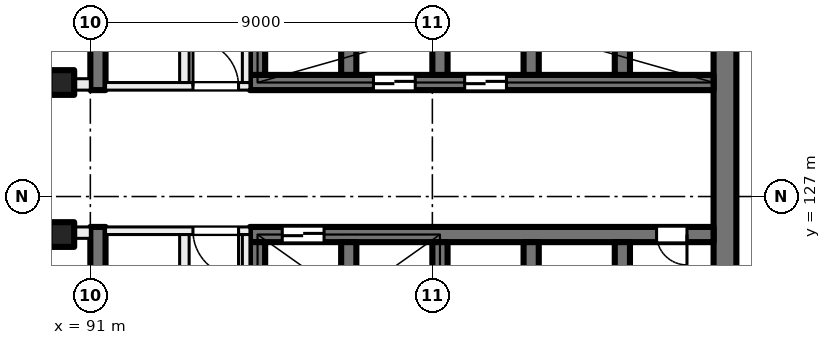
"""IFC4 building model, lengths in metres.
Left out: names, types, materials, properties, quantities, classifications, styles, units other than length and angle.
Written with IfcOpenShell. Run it as: python <this file> out.ifc"""

import sys

from ifc_helpers import new_model, si_unit, direction, frame, frame_2d, origin, origin_2d, place, context, subcontext, project, spatial, rectangle, extrude, element, fill, save


model = new_model("IFC4")
c1 = context("Model", 3, precision=1e-05, world=origin(), true_north=direction((0.0, 1.0)))
c2 = subcontext(c1, "Body", "Model", "MODEL_VIEW")
j1 = project(units=[si_unit("LENGTHUNIT", "METRE"), si_unit("PLANEANGLEUNIT", "RADIAN")], contexts=[c1])
p1 = place(None, origin())
s1 = spatial("IfcSite", under=j1, at=p1, CompositionType="ELEMENT")
p2 = place(p1, origin())
s2 = spatial("IfcBuilding", under=s1, at=p2, CompositionType="ELEMENT")
p3 = place(p2, frame((0.0, 0.0, 121.0)))
s3 = spatial("IfcBuildingStorey", under=s2, at=p3, CompositionType="ELEMENT", Elevation=121.0)
for number, where, z_axis, x_axis in (
    (1, (90.25, 130.0, 0.0), (0.0, 0.0, 1.0), (1.0, 0.0, 0.0)),
    (2, (90.25, 126.0, 0.0), (0.0, 0.0, 1.0), (1.0, 0.0, 0.0)),
):
    element("IfcColumn", number, at=place(p3, frame(where, z_axis=z_axis, x_axis=x_axis)), inside=s3, PredefinedType="COLUMN", context=c2, shape_type="SweptSolid", body=[
        extrude(rectangle(XDim=0.65, YDim=0.65, at=origin_2d()), origin(), (0.0, 0.0, 1.0), 4.0),
    ])
p4 = place(p3, frame((107.7, 135.2, 0.0), z_axis=(0.0, 0.0, 1.0), x_axis=(0.0, -1.0, 0.0)))
e3 = element("IfcWall", 3, at=p4, inside=s3, PredefinedType="SHEAR", context=c2, shape_type="SweptSolid", body=[
    extrude(rectangle(XDim=14.4, YDim=0.6, at=frame_2d((7.2, 0.0))), origin(), (0.0, 0.0, 1.0), 4.0),
])
p5 = place(p3, frame((107.4, 130.0, 0.0), z_axis=(0.0, 0.0, 1.0), x_axis=(-1.0, 0.0, 0.0)))
e4 = element("IfcWall", 4, at=p5, inside=s3, PredefinedType="SHEAR", context=c2, shape_type="SweptSolid", body=[
    extrude(rectangle(XDim=12.2, YDim=0.4, at=frame_2d((6.1, 0.0))), origin(), (0.0, 0.0, 1.0), 4.0),
])
p6 = place(p5, frame((5.45, 0.0, 0.0)))
e5 = element("IfcOpeningElement", 5, at=p6, cuts=e4, PredefinedType="OPENING", context=c2, shape_type="SweptSolid", body=[
    extrude(rectangle(XDim=1.1, YDim=2.1, at=frame_2d((0.55, 1.05))), frame((0.0, 0.21, 0.0), z_axis=(0.0, -1.0, 0.0), x_axis=(1.0, 0.0, 0.0)), (0.0, 0.0, 1.0), 0.42),
])
p7 = place(p5, frame((7.85, 0.0, 0.0)))
e6 = element("IfcOpeningElement", 6, at=p7, cuts=e4, PredefinedType="OPENING", context=c2, shape_type="SweptSolid", body=[
    extrude(rectangle(XDim=1.1, YDim=2.1, at=frame_2d((0.55, 1.05))), frame((0.0, 0.21, 0.0), z_axis=(0.0, -1.0, 0.0), x_axis=(1.0, 0.0, 0.0)), (0.0, 0.0, 1.0), 0.42),
])
for number, where, z_axis, x_axis in (
    (7, (105.0, 133.2, 0.0), (0.0, 0.0, 1.0), (0.0, -1.0, 0.0)),
    (8, (102.6, 133.2, 0.0), (0.0, 0.0, 1.0), (0.0, -1.0, 0.0)),
    (9, (100.2, 133.2, 0.0), (0.0, 0.0, 1.0), (0.0, -1.0, 0.0)),
    (10, (97.8, 133.2, 0.0), (0.0, 0.0, 1.0), (0.0, -1.0, 0.0)),
    (11, (95.4, 133.2, 0.0), (0.0, 0.0, 1.0), (0.0, -1.0, 0.0)),
):
    element("IfcWall", number, at=place(p3, frame(where, z_axis=z_axis, x_axis=x_axis)), inside=s3, PredefinedType="SHEAR", context=c2, shape_type="SweptSolid", body=[
        extrude(rectangle(XDim=3.0, YDim=0.4, at=frame_2d((1.5, 0.0))), origin(), (0.0, 0.0, 1.0), 4.0),
    ])
p8 = place(p3, frame((107.4, 126.0, 0.0), z_axis=(0.0, 0.0, 1.0), x_axis=(-1.0, 0.0, 0.0)))
e12 = element("IfcWall", 12, at=p8, inside=s3, PredefinedType="SHEAR", context=c2, shape_type="SweptSolid", body=[
    extrude(rectangle(XDim=12.2, YDim=0.4, at=frame_2d((6.1, 0.0))), origin(), (0.0, 0.0, 1.0), 4.0),
])
p9 = place(p8, frame((10.25, 0.0, 0.0)))
e13 = element("IfcOpeningElement", 13, at=p9, cuts=e12, PredefinedType="OPENING", context=c2, shape_type="SweptSolid", body=[
    extrude(rectangle(XDim=1.1, YDim=2.1, at=frame_2d((0.55, 1.05))), frame((0.0, 0.21, 0.0), z_axis=(0.0, -1.0, 0.0), x_axis=(1.0, 0.0, 0.0)), (0.0, 0.0, 1.0), 0.42),
])
p10 = place(p8, frame((0.7, 0.0, 0.0)))
e14 = element("IfcOpeningElement", 14, at=p10, cuts=e12, PredefinedType="OPENING", context=c2, shape_type="SweptSolid", body=[
    extrude(rectangle(XDim=0.8, YDim=2.1, at=frame_2d((0.4, 1.05))), frame((0.0, 0.21, 0.0), z_axis=(0.0, -1.0, 0.0), x_axis=(1.0, 0.0, 0.0)), (0.0, 0.0, 1.0), 0.42),
])
for number, where, z_axis, x_axis in (
    (15, (105.0, 125.8, 0.0), (0.0, 0.0, 1.0), (0.0, -1.0, 0.0)),
    (16, (102.6, 125.8, 0.0), (0.0, 0.0, 1.0), (0.0, -1.0, 0.0)),
    (17, (100.2, 125.8, 0.0), (0.0, 0.0, 1.0), (0.0, -1.0, 0.0)),
    (18, (97.8, 125.8, 0.0), (0.0, 0.0, 1.0), (0.0, -1.0, 0.0)),
    (19, (95.4, 125.8, 0.0), (0.0, 0.0, 1.0), (0.0, -1.0, 0.0)),
):
    element("IfcWall", number, at=place(p3, frame(where, z_axis=z_axis, x_axis=x_axis)), inside=s3, PredefinedType="SHEAR", context=c2, shape_type="SweptSolid", body=[
        extrude(rectangle(XDim=3.0, YDim=0.4, at=frame_2d((1.5, 0.0))), origin(), (0.0, 0.0, 1.0), 4.0),
    ])
for number, where, z_axis, x_axis in (
    (20, (91.2, 138.4, 0.0), (0.0, 0.0, 1.0), (0.0, -1.0, 0.0)),
    (21, (91.2, 126.2, 0.0), (0.0, 0.0, 1.0), (0.0, -1.0, 0.0)),
):
    element("IfcWall", number, at=place(p3, frame(where, z_axis=z_axis, x_axis=x_axis)), inside=s3, PredefinedType="SHEAR", context=c2, shape_type="SweptSolid", body=[
        extrude(rectangle(XDim=8.6, YDim=0.4, at=frame_2d((4.3, 0.0))), origin(), (0.0, 0.0, 1.0), 4.0),
    ])
p11 = place(p3, frame((95.2, 126.1, 0.0), z_axis=(0.0, 0.0, 1.0), x_axis=(-1.0, 0.0, 0.0)))
e22 = element("IfcWall", 22, at=p11, inside=s3, PredefinedType="PARTITIONING", context=c2, shape_type="SweptSolid", body=[
    extrude(rectangle(XDim=3.8, YDim=0.2, at=frame_2d((1.9, 0.0))), origin(), (0.0, 0.0, 1.0), 3.625),
])
p12 = place(p11, frame((0.3, 0.0, 0.0)))
e23 = element("IfcOpeningElement", 23, at=p12, cuts=e22, PredefinedType="OPENING", context=c2, shape_type="SweptSolid", body=[
    extrude(rectangle(XDim=1.2, YDim=2.1, at=frame_2d((0.6, 1.05))), frame((0.0, 0.11, 0.0), z_axis=(0.0, -1.0, 0.0), x_axis=(1.0, 0.0, 0.0)), (0.0, 0.0, 1.0), 0.22),
])
p13 = place(p3, frame((95.1, 117.6, 0.0), z_axis=(0.0, 0.0, 1.0), x_axis=(0.0, 1.0, 0.0)))
e24 = element("IfcWall", 24, at=p13, inside=s3, PredefinedType="PARTITIONING", context=c2, shape_type="SweptSolid", body=[
    extrude(rectangle(XDim=8.4, YDim=0.2, at=frame_2d((4.2, 0.0))), origin(), (0.0, 0.0, 1.0), 3.625),
])
p14 = place(p13, frame((1.65, 0.0, 0.0)))
e25 = element("IfcOpeningElement", 25, at=p14, cuts=e24, PredefinedType="OPENING", context=c2, shape_type="SweptSolid", body=[
    extrude(rectangle(XDim=1.5, YDim=2.1, at=frame_2d((0.75, 1.05))), frame((0.0, 0.11, 0.0), z_axis=(0.0, -1.0, 0.0), x_axis=(1.0, 0.0, 0.0)), (0.0, 0.0, 1.0), 0.22),
])
p15 = place(p3, frame((93.475, 117.6, 0.0), z_axis=(0.0, 0.0, 1.0), x_axis=(0.0, 1.0, 0.0)))
e26 = element("IfcWall", 26, at=p15, inside=s3, PredefinedType="PARTITIONING", context=c2, shape_type="SweptSolid", body=[
    extrude(rectangle(XDim=8.4, YDim=0.25, at=frame_2d((4.2, 0.0))), origin(), (0.0, 0.0, 1.0), 3.625),
])
p16 = place(p15, frame((5.225, 0.0, 0.0)))
e27 = element("IfcOpeningElement", 27, at=p16, cuts=e26, PredefinedType="OPENING", context=c2, shape_type="SweptSolid", body=[
    extrude(rectangle(XDim=0.8, YDim=2.1, at=frame_2d((0.4, 1.05))), frame((0.0, 0.135, 0.0), z_axis=(0.0, -1.0, 0.0), x_axis=(1.0, 0.0, 0.0)), (0.0, 0.0, 1.0), 0.27),
])
p17 = place(p15, frame((0.975, 0.0, 0.0)))
e28 = element("IfcOpeningElement", 28, at=p17, cuts=e26, PredefinedType="OPENING", context=c2, shape_type="SweptSolid", body=[
    extrude(rectangle(XDim=0.8, YDim=2.1, at=frame_2d((0.4, 1.05))), frame((0.0, 0.135, 0.0), z_axis=(0.0, -1.0, 0.0), x_axis=(1.0, 0.0, 0.0)), (0.0, 0.0, 1.0), 0.27),
])
p18 = place(p3, frame((91.4, 129.9, 0.0), z_axis=(0.0, 0.0, 1.0), x_axis=(1.0, 0.0, 0.0)))
e29 = element("IfcWall", 29, at=p18, inside=s3, PredefinedType="PARTITIONING", context=c2, shape_type="SweptSolid", body=[
    extrude(rectangle(XDim=3.8, YDim=0.2, at=frame_2d((1.9, 0.0))), origin(), (0.0, 0.0, 1.0), 3.625),
])
p19 = place(p18, frame((2.3, 0.0, 0.0)))
e30 = element("IfcOpeningElement", 30, at=p19, cuts=e29, PredefinedType="OPENING", context=c2, shape_type="SweptSolid", body=[
    extrude(rectangle(XDim=1.2, YDim=2.1, at=frame_2d((0.6, 1.05))), frame((0.0, 0.11, 0.0), z_axis=(0.0, -1.0, 0.0), x_axis=(1.0, 0.0, 0.0)), (0.0, 0.0, 1.0), 0.22),
])
p20 = place(p3, frame((95.1, 130.0, 0.0), z_axis=(0.0, 0.0, 1.0), x_axis=(0.0, 1.0, 0.0)))
e31 = element("IfcWall", 31, at=p20, inside=s3, PredefinedType="PARTITIONING", context=c2, shape_type="SweptSolid", body=[
    extrude(rectangle(XDim=8.4, YDim=0.2, at=frame_2d((4.2, 0.0))), origin(), (0.0, 0.0, 1.0), 3.625),
])
p21 = place(p20, frame((5.25, 0.0, 0.0)))
e32 = element("IfcOpeningElement", 32, at=p21, cuts=e31, PredefinedType="OPENING", context=c2, shape_type="SweptSolid", body=[
    extrude(rectangle(XDim=1.5, YDim=2.1, at=frame_2d((0.75, 1.05))), frame((0.0, 0.11, 0.0), z_axis=(0.0, -1.0, 0.0), x_axis=(1.0, 0.0, 0.0)), (0.0, 0.0, 1.0), 0.22),
])
p22 = place(p3, frame((93.475, 130.0, 0.0), z_axis=(0.0, 0.0, 1.0), x_axis=(0.0, 1.0, 0.0)))
e33 = element("IfcWall", 33, at=p22, inside=s3, PredefinedType="PARTITIONING", context=c2, shape_type="SweptSolid", body=[
    extrude(rectangle(XDim=8.4, YDim=0.25, at=frame_2d((4.2, 0.0))), origin(), (0.0, 0.0, 1.0), 3.625),
])
p23 = place(p22, frame((1.675, 0.0, 0.0)))
e34 = element("IfcOpeningElement", 34, at=p23, cuts=e33, PredefinedType="OPENING", context=c2, shape_type="SweptSolid", body=[
    extrude(rectangle(XDim=0.8, YDim=2.1, at=frame_2d((0.4, 1.05))), frame((0.0, 0.135, 0.0), z_axis=(0.0, -1.0, 0.0), x_axis=(1.0, 0.0, 0.0)), (0.0, 0.0, 1.0), 0.27),
])
p24 = place(p22, frame((5.925, 0.0, 0.0)))
e35 = element("IfcOpeningElement", 35, at=p24, cuts=e33, PredefinedType="OPENING", context=c2, shape_type="SweptSolid", body=[
    extrude(rectangle(XDim=0.8, YDim=2.1, at=frame_2d((0.4, 1.05))), frame((0.0, 0.135, 0.0), z_axis=(0.0, -1.0, 0.0), x_axis=(1.0, 0.0, 0.0)), (0.0, 0.0, 1.0), 0.27),
])
p25 = place(p3, frame((72.5, 129.95, 0.0), z_axis=(0.0, 0.0, 1.0), x_axis=(1.0, 0.0, 0.0)))
e36 = element("IfcWall", 36, at=p25, inside=s3, PredefinedType="PARTITIONING", context=c2, shape_type="SweptSolid", body=[
    extrude(rectangle(XDim=18.5, YDim=0.3, at=frame_2d((9.25, 0.0))), origin(), (0.0, 0.0, 1.0), 3.625),
])
p26 = place(p25, frame((9.35, 0.0, 0.0)))
e37 = element("IfcOpeningElement", 37, at=p26, cuts=e36, PredefinedType="OPENING", context=c2, shape_type="SweptSolid", body=[
    extrude(rectangle(XDim=1.8, YDim=2.1, at=frame_2d((0.9, 1.05))), frame((0.0, 0.16, 0.0), z_axis=(0.0, -1.0, 0.0), x_axis=(1.0, 0.0, 0.0)), (0.0, 0.0, 1.0), 0.32),
])
p27 = place(p3, frame((91.0, 126.05, 0.0), z_axis=(0.0, 0.0, 1.0), x_axis=(-1.0, 0.0, 0.0)))
e38 = element("IfcWall", 38, at=p27, inside=s3, PredefinedType="PARTITIONING", context=c2, shape_type="SweptSolid", body=[
    extrude(rectangle(XDim=43.785, YDim=0.3, at=frame_2d((21.893, 0.0))), origin(), (0.0, 0.0, 1.0), 3.625),
])
p28 = place(p27, frame((7.475, 0.0, 0.0)))
e39 = element("IfcOpeningElement", 39, at=p28, cuts=e38, PredefinedType="OPENING", context=c2, shape_type="SweptSolid", body=[
    extrude(rectangle(XDim=1.8, YDim=2.1, at=frame_2d((0.9, 1.05))), frame((0.0, 0.16, 0.0), z_axis=(0.0, -1.0, 0.0), x_axis=(1.0, 0.0, 0.0)), (0.0, 0.0, 1.0), 0.32),
])
p29 = place(p27, frame((34.0, 0.0, 0.0)))
e40 = element("IfcOpeningElement", 40, at=p29, cuts=e38, PredefinedType="OPENING", context=c2, shape_type="SweptSolid", body=[
    extrude(rectangle(XDim=1.0, YDim=2.1, at=frame_2d((0.5, 1.05))), frame((0.0, 0.16, 0.0), z_axis=(0.0, -1.0, 0.0), x_axis=(1.0, 0.0, 0.0)), (0.0, 0.0, 1.0), 0.32),
])
p30 = place(p27, frame((39.296, 0.0, 0.0)))
e41 = element("IfcOpeningElement", 41, at=p30, cuts=e38, PredefinedType="OPENING", context=c2, shape_type="SweptSolid", body=[
    extrude(rectangle(XDim=1.8, YDim=2.1, at=frame_2d((0.9, 1.05))), frame((0.0, 0.16, 0.0), z_axis=(0.0, -1.0, 0.0), x_axis=(1.0, 0.0, 0.0)), (0.0, 0.0, 1.0), 0.32),
])
p31 = place(p9, origin())
e42 = element("IfcDoor", 42, at=p31, inside=s3, OperationType="DOUBLE_DOOR_SLIDING", PredefinedType="DOOR", context=c2, shape_type="SweptSolid", body=[
    extrude(rectangle(XDim=1.1, YDim=2.1, at=frame_2d((0.55, 1.05))), frame((0.0, 0.025, 0.0), z_axis=(0.0, -1.0, 0.0), x_axis=(1.0, 0.0, 0.0)), (0.0, 0.0, 1.0), 0.05),
])
fill(e13, e42)
p32 = place(p6, origin())
e43 = element("IfcDoor", 43, at=p32, inside=s3, OperationType="DOUBLE_DOOR_SLIDING", PredefinedType="DOOR", context=c2, shape_type="SweptSolid", body=[
    extrude(rectangle(XDim=1.1, YDim=2.1, at=frame_2d((0.55, 1.05))), frame((0.0, 0.025, 0.0), z_axis=(0.0, -1.0, 0.0), x_axis=(1.0, 0.0, 0.0)), (0.0, 0.0, 1.0), 0.05),
])
fill(e5, e43)
p33 = place(p7, origin())
e44 = element("IfcDoor", 44, at=p33, inside=s3, OperationType="DOUBLE_DOOR_SLIDING", PredefinedType="DOOR", context=c2, shape_type="SweptSolid", body=[
    extrude(rectangle(XDim=1.1, YDim=2.1, at=frame_2d((0.55, 1.05))), frame((0.0, 0.025, 0.0), z_axis=(0.0, -1.0, 0.0), x_axis=(1.0, 0.0, 0.0)), (0.0, 0.0, 1.0), 0.05),
])
fill(e6, e44)
p34 = place(p10, origin())
e45 = element("IfcDoor", 45, at=p34, inside=s3, OperationType="SINGLE_SWING_LEFT", PredefinedType="DOOR", context=c2, shape_type="SweptSolid", body=[
    extrude(rectangle(XDim=0.8, YDim=2.1, at=frame_2d((0.4, 1.05))), frame((0.0, 0.025, 0.0), z_axis=(0.0, -1.0, 0.0), x_axis=(1.0, 0.0, 0.0)), (0.0, 0.0, 1.0), 0.05),
])
fill(e14, e45)
p35 = place(p12, origin())
e46 = element("IfcDoor", 46, at=p35, inside=s3, OperationType="DOUBLE_DOOR_SINGLE_SWING", PredefinedType="DOOR", context=c2, shape_type="SweptSolid", body=[
    extrude(rectangle(XDim=1.2, YDim=2.1, at=frame_2d((0.6, 1.05))), frame((0.0, 0.025, 0.0), z_axis=(0.0, -1.0, 0.0), x_axis=(1.0, 0.0, 0.0)), (0.0, 0.0, 1.0), 0.05),
])
fill(e23, e46)
p36 = place(p19, origin())
e47 = element("IfcDoor", 47, at=p36, inside=s3, OperationType="DOUBLE_DOOR_SINGLE_SWING", PredefinedType="DOOR", context=c2, shape_type="SweptSolid", body=[
    extrude(rectangle(XDim=1.2, YDim=2.1, at=frame_2d((0.6, 1.05))), frame((0.0, 0.025, 0.0), z_axis=(0.0, -1.0, 0.0), x_axis=(1.0, 0.0, 0.0)), (0.0, 0.0, 1.0), 0.05),
])
fill(e30, e47)
save(model, sys.argv[1])
